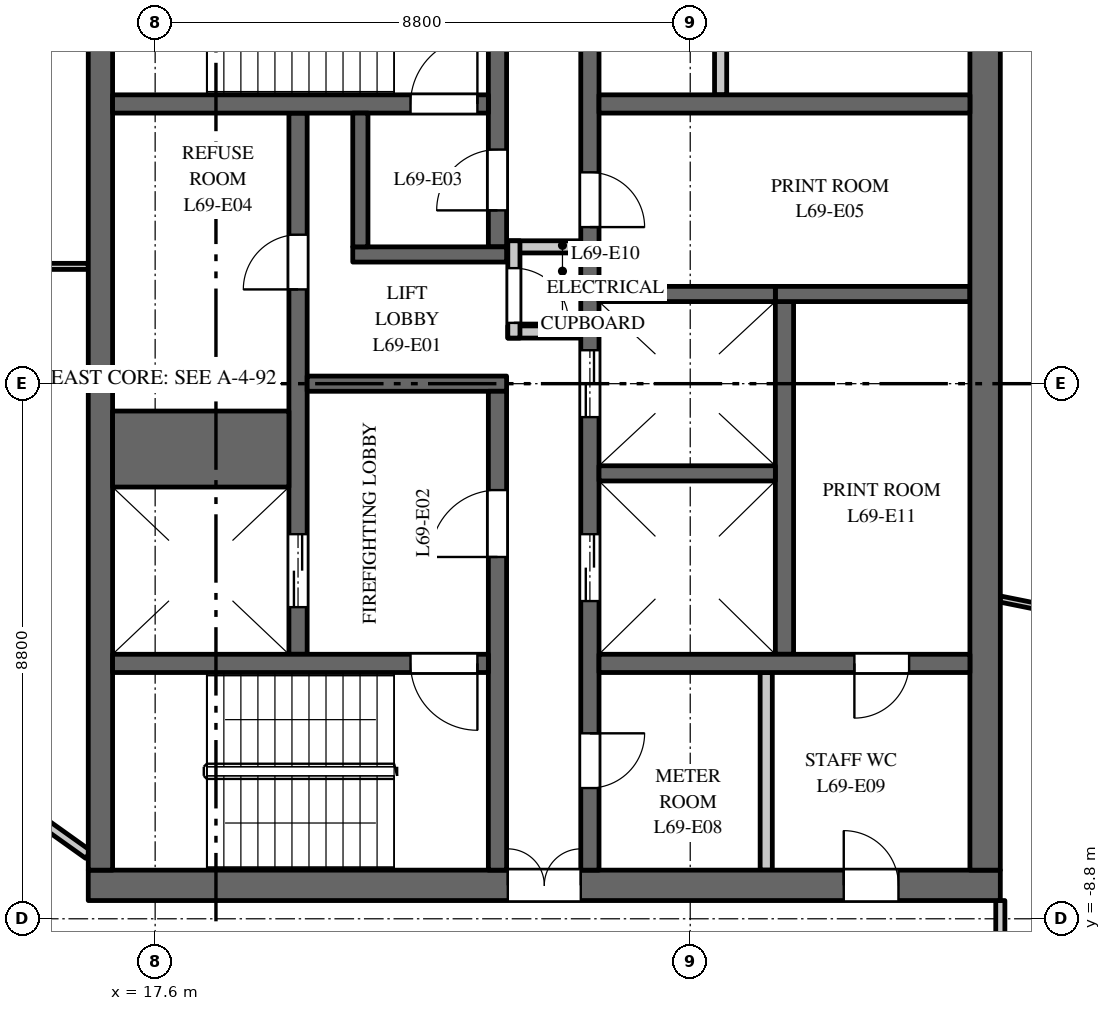
"""IFC4 building model, lengths in metres.
Left out: names, types, materials, properties, quantities, classifications, styles, units other than length and angle.
Written with IfcOpenShell. Run it as: python <this file> out.ifc"""

import sys

from ifc_helpers import new_model, si_unit, direction, frame, frame_2d, origin, place, context, subcontext, project, spatial, rectangle, extrude, element, fill, save


model = new_model("IFC4")
c1 = context("Model", 3, precision=1e-05, world=origin(), true_north=direction((0.0, 1.0)))
c2 = subcontext(c1, "Body", "Model", "MODEL_VIEW")
j1 = project(units=[si_unit("LENGTHUNIT", "METRE"), si_unit("PLANEANGLEUNIT", "RADIAN")], contexts=[c1])
p1 = place(None, origin())
s1 = spatial("IfcSite", under=j1, at=p1, CompositionType="ELEMENT")
p2 = place(p1, origin())
s2 = spatial("IfcBuilding", under=s1, at=p2, CompositionType="ELEMENT")
p3 = place(p2, frame((0.0, 0.0, 319.0)))
s3 = spatial("IfcBuildingStorey", under=s2, at=p3, CompositionType="ELEMENT", Elevation=319.0)
p4 = place(p3, frame((16.5, -8.25, 0.0), z_axis=(0.0, 0.0, 1.0), x_axis=(1.0, 0.0, 0.0)))
e1 = element("IfcWall", 1, at=p4, inside=s3, PredefinedType="SHEAR", context=c2, shape_type="SweptSolid", body=[
    extrude(rectangle(XDim=15.0, YDim=0.5, at=frame_2d((7.5, 0.0))), origin(), (0.0, 0.0, 1.0), 3.7),
])
p5 = place(p4, frame((6.9, 0.0, 0.0)))
e2 = element("IfcOpeningElement", 2, at=p5, cuts=e1, PredefinedType="OPENING", context=c2, shape_type="SweptSolid", body=[
    extrude(rectangle(XDim=1.2, YDim=2.1, at=frame_2d((0.6, 1.05))), frame((0.0, 0.26, 0.0), z_axis=(0.0, -1.0, 0.0), x_axis=(1.0, 0.0, 0.0)), (0.0, 0.0, 1.0), 0.52),
])
p6 = place(p4, frame((12.425, 0.0, 0.0)))
e3 = element("IfcOpeningElement", 3, at=p6, cuts=e1, PredefinedType="OPENING", context=c2, shape_type="SweptSolid", body=[
    extrude(rectangle(XDim=0.9, YDim=2.1, at=frame_2d((0.45, 1.05))), frame((0.0, 0.26, 0.0), z_axis=(0.0, -1.0, 0.0), x_axis=(1.0, 0.0, 0.0)), (0.0, 0.0, 1.0), 0.52),
])
p7 = place(p3, frame((27.95, -4.45, 0.0), z_axis=(0.0, 0.0, 1.0), x_axis=(0.0, 1.0, 0.0)))
e4 = element("IfcWall", 4, at=p7, inside=s3, PredefinedType="SHEAR", context=c2, shape_type="SweptSolid", body=[
    extrude(rectangle(XDim=5.8, YDim=0.3, at=frame_2d((2.9, 0.0))), origin(), (0.0, 0.0, 1.0), 3.7),
])
p8 = place(p3, frame((27.8, 1.475, 0.0), z_axis=(0.0, 0.0, 1.0), x_axis=(1.0, 0.0, 0.0)))
e5 = element("IfcWall", 5, at=p8, inside=s3, PredefinedType="SHEAR", context=c2, shape_type="SweptSolid", body=[
    extrude(rectangle(XDim=3.2, YDim=0.25, at=frame_2d((1.6, 0.0))), origin(), (0.0, 0.0, 1.0), 3.7),
])
p9 = place(p3, frame((19.95, -4.45, 0.0), z_axis=(0.0, 0.0, 1.0), x_axis=(0.0, 1.0, 0.0)))
e6 = element("IfcWall", 6, at=p9, inside=s3, PredefinedType="SHEAR", context=c2, shape_type="SweptSolid", body=[
    extrude(rectangle(XDim=8.9, YDim=0.3, at=frame_2d((4.45, 0.0))), origin(), (0.0, 0.0, 1.0), 3.7),
])
p10 = place(p9, frame((0.775, 0.0, 0.0)))
e7 = element("IfcOpeningElement", 7, at=p10, cuts=e6, PredefinedType="OPENING", context=c2, shape_type="SweptSolid", body=[
    extrude(rectangle(XDim=1.2, YDim=2.1, at=frame_2d((0.6, 1.05))), frame((0.0, 0.16, 0.0), z_axis=(0.0, -1.0, 0.0), x_axis=(1.0, 0.0, 0.0)), (0.0, 0.0, 1.0), 0.32),
])
p11 = place(p9, frame((6.0, 0.0, 0.0)))
e8 = element("IfcOpeningElement", 8, at=p11, cuts=e6, PredefinedType="OPENING", context=c2, shape_type="SweptSolid", body=[
    extrude(rectangle(XDim=0.9, YDim=2.1, at=frame_2d((0.45, 1.05))), frame((0.0, 0.16, 0.0), z_axis=(0.0, -1.0, 0.0), x_axis=(1.0, 0.0, 0.0)), (0.0, 0.0, 1.0), 0.32),
])
p12 = place(p3, frame((24.75, -8.0, 0.0), z_axis=(0.0, 0.0, 1.0), x_axis=(0.0, 1.0, 0.0)))
e9 = element("IfcWall", 9, at=p12, inside=s3, PredefinedType="SHEAR", context=c2, shape_type="SweptSolid", body=[
    extrude(rectangle(XDim=16.0, YDim=0.3, at=frame_2d((8.0, 0.0))), origin(), (0.0, 0.0, 1.0), 3.7),
])
p13 = place(p12, frame((4.425, 0.0, 0.0)))
e10 = element("IfcOpeningElement", 10, at=p13, cuts=e9, PredefinedType="OPENING", context=c2, shape_type="SweptSolid", body=[
    extrude(rectangle(XDim=1.1, YDim=2.1, at=frame_2d((0.55, 1.05))), frame((0.0, 0.16, 0.0), z_axis=(0.0, -1.0, 0.0), x_axis=(1.0, 0.0, 0.0)), (0.0, 0.0, 1.0), 0.32),
])
p14 = place(p12, frame((7.45, 0.0, 0.0)))
e11 = element("IfcOpeningElement", 11, at=p14, cuts=e9, PredefinedType="OPENING", context=c2, shape_type="SweptSolid", body=[
    extrude(rectangle(XDim=1.1, YDim=2.1, at=frame_2d((0.55, 1.05))), frame((0.0, 0.16, 0.0), z_axis=(0.0, -1.0, 0.0), x_axis=(1.0, 0.0, 0.0)), (0.0, 0.0, 1.0), 0.32),
])
p15 = place(p12, frame((10.575, 0.0, 0.0)))
e12 = element("IfcOpeningElement", 12, at=p15, cuts=e9, PredefinedType="OPENING", context=c2, shape_type="SweptSolid", body=[
    extrude(rectangle(XDim=0.9, YDim=2.1, at=frame_2d((0.45, 1.05))), frame((0.0, 0.16, 0.0), z_axis=(0.0, -1.0, 0.0), x_axis=(1.0, 0.0, 0.0)), (0.0, 0.0, 1.0), 0.32),
])
p16 = place(p12, frame((13.75, 0.0, 0.0)))
e13 = element("IfcOpeningElement", 13, at=p16, cuts=e9, PredefinedType="OPENING", context=c2, shape_type="SweptSolid", body=[
    extrude(rectangle(XDim=0.9, YDim=2.1, at=frame_2d((0.45, 1.05))), frame((0.0, 0.16, 0.0), z_axis=(0.0, -1.0, 0.0), x_axis=(1.0, 0.0, 0.0)), (0.0, 0.0, 1.0), 0.32),
])
p17 = place(p12, frame((1.35, 0.0, 0.0)))
e14 = element("IfcOpeningElement", 14, at=p17, cuts=e9, PredefinedType="OPENING", context=c2, shape_type="SweptSolid", body=[
    extrude(rectangle(XDim=0.9, YDim=2.1, at=frame_2d((0.45, 1.05))), frame((0.0, 0.16, 0.0), z_axis=(0.0, -1.0, 0.0), x_axis=(1.0, 0.0, 0.0)), (0.0, 0.0, 1.0), 0.32),
])
p18 = place(p3, frame((20.1, 0.0, 0.0), z_axis=(0.0, 0.0, 1.0), x_axis=(1.0, 0.0, 0.0)))
e15 = element("IfcWall", 15, at=p18, inside=s3, PredefinedType="SHEAR", context=c2, shape_type="SweptSolid", body=[
    extrude(rectangle(XDim=3.28, YDim=0.25, at=frame_2d((1.64, 0.0))), origin(), (0.0, 0.0, 1.0), 3.7),
])
p19 = place(p3, frame((16.7, -8.0, 0.0), z_axis=(0.0, 0.0, 1.0), x_axis=(0.0, 1.0, 0.0)))
e16 = element("IfcWall", 16, at=p19, inside=s3, PredefinedType="SHEAR", context=c2, shape_type="SweptSolid", body=[
    extrude(rectangle(XDim=16.0, YDim=0.4, at=frame_2d((8.0, 0.0))), origin(), (0.0, 0.0, 1.0), 3.7),
])
for number, where, z_axis, x_axis in (
    (17, (23.4, 0.85, 0.0), (0.0, 0.0, 1.0), (1.0, 0.0, 0.0)),
    (18, (23.4, 2.25, 0.0), (0.0, 0.0, 1.0), (1.0, 0.0, 0.0)),
):
    element("IfcWall", number, at=place(p3, frame(where, z_axis=z_axis, x_axis=x_axis)), inside=s3, PredefinedType="PARTITIONING", context=c2, shape_type="SweptSolid", body=[
        extrude(rectangle(XDim=1.2, YDim=0.2, at=frame_2d((0.6, 0.0))), origin(), (0.0, 0.0, 1.0), 3.7),
    ])
p20 = place(p3, frame((23.5, 0.75, 0.0), z_axis=(0.0, 0.0, 1.0), x_axis=(0.0, 1.0, 0.0)))
e19 = element("IfcWall", 19, at=p20, inside=s3, PredefinedType="PARTITIONING", context=c2, shape_type="SweptSolid", body=[
    extrude(rectangle(XDim=1.6, YDim=0.2, at=frame_2d((0.8, 0.0))), origin(), (0.0, 0.0, 1.0), 3.7),
])
p21 = place(p20, frame((0.25, 0.0, 0.0)))
e20 = element("IfcOpeningElement", 20, at=p21, cuts=e19, PredefinedType="OPENING", context=c2, shape_type="SweptSolid", body=[
    extrude(rectangle(XDim=0.9, YDim=2.1, at=frame_2d((0.45, 1.05))), frame((0.0, 0.11, 0.0), z_axis=(0.0, -1.0, 0.0), x_axis=(1.0, 0.0, 0.0)), (0.0, 0.0, 1.0), 0.22),
])
p22 = place(p3, frame((31.25, -8.0, 0.0), z_axis=(0.0, 0.0, 1.0), x_axis=(0.0, 1.0, 0.0)))
e21 = element("IfcWall", 21, at=p22, inside=s3, PredefinedType="SHEAR", context=c2, shape_type="SweptSolid", body=[
    extrude(rectangle(XDim=16.0, YDim=0.5, at=frame_2d((8.0, 0.0))), origin(), (0.0, 0.0, 1.0), 3.7),
])
p23 = place(p3, frame((24.9, 4.6, 0.0), z_axis=(0.0, 0.0, 1.0), x_axis=(1.0, 0.0, 0.0)))
e22 = element("IfcWall", 22, at=p23, inside=s3, PredefinedType="SHEAR", context=c2, shape_type="SweptSolid", body=[
    extrude(rectangle(XDim=6.1, YDim=0.3, at=frame_2d((3.05, 0.0))), origin(), (0.0, 0.0, 1.0), 3.7),
])
for number, where, z_axis, x_axis in (
    (23, (26.9, 4.75, 0.0), (0.0, 0.0, 1.0), (0.0, 1.0, 0.0)),
    (24, (27.65, -8.0, 0.0), (0.0, 0.0, 1.0), (0.0, 1.0, 0.0)),
):
    element("IfcWall", number, at=place(p3, frame(where, z_axis=z_axis, x_axis=x_axis)), inside=s3, PredefinedType="PARTITIONING", context=c2, shape_type="SweptSolid", body=[
        extrude(rectangle(XDim=3.25, YDim=0.2, at=frame_2d((1.625, 0.0))), origin(), (0.0, 0.0, 1.0), 3.7),
    ])
p24 = place(p3, frame((24.9, -4.6, 0.0), z_axis=(0.0, 0.0, 1.0), x_axis=(1.0, 0.0, 0.0)))
e25 = element("IfcWall", 25, at=p24, inside=s3, PredefinedType="SHEAR", context=c2, shape_type="SweptSolid", body=[
    extrude(rectangle(XDim=6.1, YDim=0.3, at=frame_2d((3.05, 0.0))), origin(), (0.0, 0.0, 1.0), 3.7),
])
p25 = place(p24, frame((4.2, 0.0, 0.0)))
e26 = element("IfcOpeningElement", 26, at=p25, cuts=e25, PredefinedType="OPENING", context=c2, shape_type="SweptSolid", body=[
    extrude(rectangle(XDim=0.9, YDim=2.1, at=frame_2d((0.45, 1.05))), frame((0.0, 0.16, 0.0), z_axis=(0.0, -1.0, 0.0), x_axis=(1.0, 0.0, 0.0)), (0.0, 0.0, 1.0), 0.32),
])
p26 = place(p3, frame((16.9, -1.075, 0.0), z_axis=(0.0, 0.0, 1.0), x_axis=(1.0, 0.0, 0.0)))
e27 = element("IfcWall", 27, at=p26, inside=s3, PredefinedType="SHEAR", context=c2, shape_type="SweptSolid", body=[
    extrude(rectangle(XDim=2.9, YDim=1.25, at=frame_2d((1.45, 0.0))), origin(), (0.0, 0.0, 1.0), 3.7),
])
for number, where, z_axis, x_axis in (
    (28, (24.9, -1.475, 0.0), (0.0, 0.0, 1.0), (1.0, 0.0, 0.0)),
    (29, (24.9, 1.475, 0.0), (0.0, 0.0, 1.0), (1.0, 0.0, 0.0)),
):
    element("IfcWall", number, at=place(p3, frame(where, z_axis=z_axis, x_axis=x_axis)), inside=s3, PredefinedType="SHEAR", context=c2, shape_type="SweptSolid", body=[
        extrude(rectangle(XDim=2.9, YDim=0.25, at=frame_2d((1.45, 0.0))), origin(), (0.0, 0.0, 1.0), 3.7),
    ])
p27 = place(p3, frame((23.23, 2.25, 0.0), z_axis=(0.0, 0.0, 1.0), x_axis=(0.0, 1.0, 0.0)))
e30 = element("IfcWall", 30, at=p27, inside=s3, PredefinedType="SHEAR", context=c2, shape_type="SweptSolid", body=[
    extrude(rectangle(XDim=5.75, YDim=0.3, at=frame_2d((2.875, 0.0))), origin(), (0.0, 0.0, 1.0), 3.7),
])
p28 = place(p27, frame((0.6, 0.0, 0.0)))
e31 = element("IfcOpeningElement", 31, at=p28, cuts=e30, PredefinedType="OPENING", context=c2, shape_type="SweptSolid", body=[
    extrude(rectangle(XDim=1.0, YDim=2.1, at=frame_2d((0.5, 1.05))), frame((0.0, 0.16, 0.0), z_axis=(0.0, -1.0, 0.0), x_axis=(1.0, 0.0, 0.0)), (0.0, 0.0, 1.0), 0.32),
])
p29 = place(p3, frame((23.23, -8.0, 0.0), z_axis=(0.0, 0.0, 1.0), x_axis=(0.0, 1.0, 0.0)))
e32 = element("IfcWall", 32, at=p29, inside=s3, PredefinedType="SHEAR", context=c2, shape_type="SweptSolid", body=[
    extrude(rectangle(XDim=7.875, YDim=0.3, at=frame_2d((3.938, 0.0))), origin(), (0.0, 0.0, 1.0), 3.7),
])
p30 = place(p29, frame((5.15, 0.0, 0.0)))
e33 = element("IfcOpeningElement", 33, at=p30, cuts=e32, PredefinedType="OPENING", context=c2, shape_type="SweptSolid", body=[
    extrude(rectangle(XDim=1.1, YDim=2.1, at=frame_2d((0.55, 1.05))), frame((0.0, 0.16, 0.0), z_axis=(0.0, -1.0, 0.0), x_axis=(1.0, 0.0, 0.0)), (0.0, 0.0, 1.0), 0.32),
])
p31 = place(p3, frame((16.9, 4.6, 0.0), z_axis=(0.0, 0.0, 1.0), x_axis=(1.0, 0.0, 0.0)))
e34 = element("IfcWall", 34, at=p31, inside=s3, PredefinedType="SHEAR", context=c2, shape_type="SweptSolid", body=[
    extrude(rectangle(XDim=6.18, YDim=0.3, at=frame_2d((3.09, 0.0))), origin(), (0.0, 0.0, 1.0), 3.7),
])
p32 = place(p31, frame((4.9, 0.0, 0.0)))
e35 = element("IfcOpeningElement", 35, at=p32, cuts=e34, PredefinedType="OPENING", context=c2, shape_type="SweptSolid", body=[
    extrude(rectangle(XDim=1.1, YDim=2.1, at=frame_2d((0.55, 1.05))), frame((0.0, 0.16, 0.0), z_axis=(0.0, -1.0, 0.0), x_axis=(1.0, 0.0, 0.0)), (0.0, 0.0, 1.0), 0.32),
])
p33 = place(p3, frame((16.9, -4.6, 0.0), z_axis=(0.0, 0.0, 1.0), x_axis=(1.0, 0.0, 0.0)))
e36 = element("IfcWall", 36, at=p33, inside=s3, PredefinedType="SHEAR", context=c2, shape_type="SweptSolid", body=[
    extrude(rectangle(XDim=6.18, YDim=0.3, at=frame_2d((3.09, 0.0))), origin(), (0.0, 0.0, 1.0), 3.7),
])
p34 = place(p33, frame((4.9, 0.0, 0.0)))
e37 = element("IfcOpeningElement", 37, at=p34, cuts=e36, PredefinedType="OPENING", context=c2, shape_type="SweptSolid", body=[
    extrude(rectangle(XDim=1.1, YDim=2.1, at=frame_2d((0.55, 1.05))), frame((0.0, 0.16, 0.0), z_axis=(0.0, -1.0, 0.0), x_axis=(1.0, 0.0, 0.0)), (0.0, 0.0, 1.0), 0.32),
])
p35 = place(p3, frame((20.85, 2.125, 0.0), z_axis=(0.0, 0.0, 1.0), x_axis=(1.0, 0.0, 0.0)))
e38 = element("IfcWall", 38, at=p35, inside=s3, PredefinedType="SHEAR", context=c2, shape_type="SweptSolid", body=[
    extrude(rectangle(XDim=2.53, YDim=0.25, at=frame_2d((1.265, 0.0))), origin(), (0.0, 0.0, 1.0), 3.7),
])
p36 = place(p3, frame((20.975, 2.25, 0.0), z_axis=(0.0, 0.0, 1.0), x_axis=(0.0, 1.0, 0.0)))
e39 = element("IfcWall", 39, at=p36, inside=s3, PredefinedType="SHEAR", context=c2, shape_type="SweptSolid", body=[
    extrude(rectangle(XDim=2.2, YDim=0.25, at=frame_2d((1.1, 0.0))), origin(), (0.0, 0.0, 1.0), 3.7),
])
p37 = place(p3, frame((10.97, -3.799, 0.0), z_axis=(0.0, 0.0, 1.0), x_axis=(0.814095150002, -0.580731510032, 0.0)))
e40 = element("IfcWall", 40, at=p37, inside=s3, PredefinedType="PARTITIONING", context=c2, shape_type="SweptSolid", body=[
    extrude(rectangle(XDim=6.793, YDim=0.15, at=frame_2d((3.396, 0.0))), origin(), (0.0, 0.0, 1.0), 3.7),
])
p38 = place(p37, frame((4.267, 0.0, 0.0)))
e41 = element("IfcOpeningElement", 41, at=p38, cuts=e40, PredefinedType="OPENING", context=c2, shape_type="SweptSolid", body=[
    extrude(rectangle(XDim=1.0, YDim=2.1, at=frame_2d((0.5, 1.05))), frame((0.0, 0.085, 0.0), z_axis=(0.0, -1.0, 0.0), x_axis=(1.0, 0.0, 0.0)), (0.0, 0.0, 1.0), 0.17),
])
p39 = place(p3, frame((10.97, 3.799, 0.0), z_axis=(0.0, 0.0, 1.0), x_axis=(0.814095150002, 0.580731510032, 0.0)))
e42 = element("IfcWall", 42, at=p39, inside=s3, PredefinedType="PARTITIONING", context=c2, shape_type="SweptSolid", body=[
    extrude(rectangle(XDim=6.793, YDim=0.15, at=frame_2d((3.396, 0.0))), origin(), (0.0, 0.0, 1.0), 3.7),
])
p40 = place(p39, frame((4.4, 0.0, 0.0)))
e43 = element("IfcOpeningElement", 43, at=p40, cuts=e42, PredefinedType="OPENING", context=c2, shape_type="SweptSolid", body=[
    extrude(rectangle(XDim=1.0, YDim=2.1, at=frame_2d((0.5, 1.05))), frame((0.0, 0.085, 0.0), z_axis=(0.0, -1.0, 0.0), x_axis=(1.0, 0.0, 0.0)), (0.0, 0.0, 1.0), 0.17),
])
p41 = place(p3, frame((11.525, 1.929, 0.0), z_axis=(0.0, 0.0, 1.0), x_axis=(1.0, 0.0, 0.0)))
e44 = element("IfcWall", 44, at=p41, inside=s3, PredefinedType="PARTITIONING", context=c2, shape_type="SweptSolid", body=[
    extrude(rectangle(XDim=4.975, YDim=0.1, at=frame_2d((2.488, 0.0))), origin(), (0.0, 0.0, 1.0), 3.7),
])
p42 = place(p3, frame((31.5, -10.7, 0.0), z_axis=(0.0, 0.0, 1.0), x_axis=(0.0, 1.0, 0.0)))
e45 = element("IfcWall", 45, at=p42, inside=s3, PredefinedType="PARTITIONING", context=c2, shape_type="SweptSolid", body=[
    extrude(rectangle(XDim=2.2, YDim=0.15, at=frame_2d((1.1, 0.0))), origin(), (0.0, 0.0, 1.0), 3.0),
])
p43 = place(p3, frame((31.5, -3.542, 0.0), z_axis=(0.0, 0.0, 1.0), x_axis=(0.980357474535, -0.197228857227, 0.0)))
e46 = element("IfcWall", 46, at=p43, inside=s3, PredefinedType="PARTITIONING", context=c2, shape_type="SweptSolid", body=[
    extrude(rectangle(XDim=4.092, YDim=0.1, at=frame_2d((2.046, 0.0))), origin(), (0.0, 0.0, 1.0), 3.0),
])
p44 = place(p3, frame((16.352, -9.942, 0.0), z_axis=(0.0, 0.0, 1.0), x_axis=(-0.750621325629, 0.660732642989, 0.0)))
e47 = element("IfcWall", 47, at=p44, inside=s3, PredefinedType="PARTITIONING", context=c2, shape_type="SweptSolid", body=[
    extrude(rectangle(XDim=1.681, YDim=0.15, at=frame_2d((0.841, 0.0))), origin(), (0.0, 0.0, 1.0), 3.7),
])
p45 = place(p10, origin())
e48 = element("IfcDoor", 48, at=p45, inside=s3, OperationType="DOUBLE_DOOR_SLIDING", PredefinedType="DOOR", context=c2, shape_type="SweptSolid", body=[
    extrude(rectangle(XDim=1.2, YDim=2.1, at=frame_2d((0.6, 1.05))), frame((0.0, 0.025, 0.0), z_axis=(0.0, -1.0, 0.0), x_axis=(1.0, 0.0, 0.0)), (0.0, 0.0, 1.0), 0.05),
])
fill(e7, e48)
p46 = place(p13, origin())
e49 = element("IfcDoor", 49, at=p46, inside=s3, OperationType="DOUBLE_DOOR_SLIDING", PredefinedType="DOOR", context=c2, shape_type="SweptSolid", body=[
    extrude(rectangle(XDim=1.1, YDim=2.1, at=frame_2d((0.55, 1.05))), frame((0.0, 0.025, 0.0), z_axis=(0.0, -1.0, 0.0), x_axis=(1.0, 0.0, 0.0)), (0.0, 0.0, 1.0), 0.05),
])
fill(e10, e49)
p47 = place(p14, origin())
e50 = element("IfcDoor", 50, at=p47, inside=s3, OperationType="DOUBLE_DOOR_SLIDING", PredefinedType="DOOR", context=c2, shape_type="SweptSolid", body=[
    extrude(rectangle(XDim=1.1, YDim=2.1, at=frame_2d((0.55, 1.05))), frame((0.0, 0.025, 0.0), z_axis=(0.0, -1.0, 0.0), x_axis=(1.0, 0.0, 0.0)), (0.0, 0.0, 1.0), 0.05),
])
fill(e11, e50)
p48 = place(p32, origin())
e51 = element("IfcDoor", 51, at=p48, inside=s3, OperationType="SINGLE_SWING_LEFT", PredefinedType="DOOR", context=c2, shape_type="SweptSolid", body=[
    extrude(rectangle(XDim=1.1, YDim=2.1, at=frame_2d((0.55, 1.05))), frame((0.0, 0.025, 0.0), z_axis=(0.0, -1.0, 0.0), x_axis=(1.0, 0.0, 0.0)), (0.0, 0.0, 1.0), 0.05),
])
fill(e35, e51)
p49 = place(p34, origin())
e52 = element("IfcDoor", 52, at=p49, inside=s3, OperationType="SINGLE_SWING_RIGHT", PredefinedType="DOOR", context=c2, shape_type="SweptSolid", body=[
    extrude(rectangle(XDim=1.1, YDim=2.1, at=frame_2d((0.55, 1.05))), frame((0.0, 0.025, 0.0), z_axis=(0.0, -1.0, 0.0), x_axis=(1.0, 0.0, 0.0)), (0.0, 0.0, 1.0), 0.05),
])
fill(e37, e52)
p50 = place(p30, origin())
e53 = element("IfcDoor", 53, at=p50, inside=s3, OperationType="SINGLE_SWING_RIGHT", PredefinedType="DOOR", context=c2, shape_type="SweptSolid", body=[
    extrude(rectangle(XDim=1.1, YDim=2.1, at=frame_2d((0.55, 1.05))), frame((0.0, 0.025, 0.0), z_axis=(0.0, -1.0, 0.0), x_axis=(1.0, 0.0, 0.0)), (0.0, 0.0, 1.0), 0.05),
])
fill(e33, e53)
p51 = place(p28, origin())
e54 = element("IfcDoor", 54, at=p51, inside=s3, OperationType="SINGLE_SWING_RIGHT", PredefinedType="DOOR", context=c2, shape_type="SweptSolid", body=[
    extrude(rectangle(XDim=1.0, YDim=2.1, at=frame_2d((0.5, 1.05))), frame((0.0, 0.025, 0.0), z_axis=(0.0, -1.0, 0.0), x_axis=(1.0, 0.0, 0.0)), (0.0, 0.0, 1.0), 0.05),
])
fill(e31, e54)
p52 = place(p5, origin())
e55 = element("IfcDoor", 55, at=p52, inside=s3, OperationType="DOUBLE_DOOR_DOUBLE_SWING", PredefinedType="DOOR", context=c2, shape_type="SweptSolid", body=[
    extrude(rectangle(XDim=1.2, YDim=2.1, at=frame_2d((0.6, 1.05))), frame((0.0, 0.025, 0.0), z_axis=(0.0, -1.0, 0.0), x_axis=(1.0, 0.0, 0.0)), (0.0, 0.0, 1.0), 0.05),
])
fill(e2, e55)
p53 = place(p11, origin())
e56 = element("IfcDoor", 56, at=p53, inside=s3, OperationType="SINGLE_SWING_RIGHT", PredefinedType="DOOR", context=c2, shape_type="SweptSolid", body=[
    extrude(rectangle(XDim=0.9, YDim=2.1, at=frame_2d((0.45, 1.05))), frame((0.0, 0.025, 0.0), z_axis=(0.0, -1.0, 0.0), x_axis=(1.0, 0.0, 0.0)), (0.0, 0.0, 1.0), 0.05),
])
fill(e8, e56)
p54 = place(p15, origin())
e57 = element("IfcDoor", 57, at=p54, inside=s3, OperationType="SINGLE_SWING_LEFT", PredefinedType="DOOR", context=c2, shape_type="SweptSolid", body=[
    extrude(rectangle(XDim=0.9, YDim=2.1, at=frame_2d((0.45, 1.05))), frame((0.0, 0.025, 0.0), z_axis=(0.0, -1.0, 0.0), x_axis=(1.0, 0.0, 0.0)), (0.0, 0.0, 1.0), 0.05),
])
fill(e12, e57)
p55 = place(p17, origin())
e58 = element("IfcDoor", 58, at=p55, inside=s3, OperationType="SINGLE_SWING_RIGHT", PredefinedType="DOOR", context=c2, shape_type="SweptSolid", body=[
    extrude(rectangle(XDim=0.9, YDim=2.1, at=frame_2d((0.45, 1.05))), frame((0.0, 0.025, 0.0), z_axis=(0.0, -1.0, 0.0), x_axis=(1.0, 0.0, 0.0)), (0.0, 0.0, 1.0), 0.05),
])
fill(e14, e58)
p56 = place(p6, origin())
e59 = element("IfcDoor", 59, at=p56, inside=s3, OperationType="SINGLE_SWING_RIGHT", PredefinedType="DOOR", context=c2, shape_type="SweptSolid", body=[
    extrude(rectangle(XDim=0.9, YDim=2.1, at=frame_2d((0.45, 1.05))), frame((0.0, 0.025, 0.0), z_axis=(0.0, -1.0, 0.0), x_axis=(1.0, 0.0, 0.0)), (0.0, 0.0, 1.0), 0.05),
])
fill(e3, e59)
p57 = place(p21, origin())
e60 = element("IfcDoor", 60, at=p57, inside=s3, OperationType="SINGLE_SWING_LEFT", PredefinedType="DOOR", context=c2, shape_type="SweptSolid", body=[
    extrude(rectangle(XDim=0.9, YDim=2.1, at=frame_2d((0.45, 1.05))), frame((0.0, 0.025, 0.0), z_axis=(0.0, -1.0, 0.0), x_axis=(1.0, 0.0, 0.0)), (0.0, 0.0, 1.0), 0.05),
])
fill(e20, e60)
p58 = place(p25, origin())
e61 = element("IfcDoor", 61, at=p58, inside=s3, OperationType="SINGLE_SWING_LEFT", PredefinedType="DOOR", context=c2, shape_type="SweptSolid", body=[
    extrude(rectangle(XDim=0.9, YDim=2.1, at=frame_2d((0.45, 1.05))), frame((0.0, 0.025, 0.0), z_axis=(0.0, -1.0, 0.0), x_axis=(1.0, 0.0, 0.0)), (0.0, 0.0, 1.0), 0.05),
])
fill(e26, e61)
save(model, sys.argv[1])
